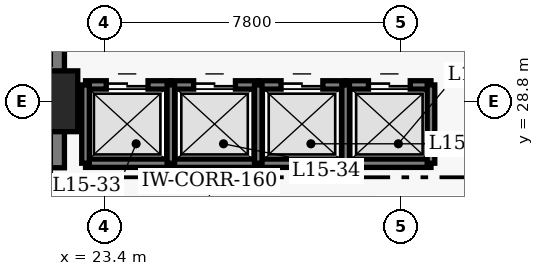
"""IFC4 building model, lengths in metres.
Left out: names, types, materials, properties, quantities, classifications, styles, units other than length and angle.
Written with IfcOpenShell. Run it as: python <this file> out.ifc"""

import sys

from ifc_helpers import new_model, si_unit, direction, frame, frame_2d, origin, origin_2d, place, context, subcontext, project, spatial, rectangle, extrude, element, fill, save


model = new_model("IFC4")
c1 = context("Model", 3, precision=1e-05, world=origin(), true_north=direction((0.0, 1.0)))
c2 = subcontext(c1, "Body", "Model", "MODEL_VIEW")
j1 = project(units=[si_unit("LENGTHUNIT", "METRE"), si_unit("PLANEANGLEUNIT", "RADIAN")], contexts=[c1])
p1 = place(None, origin())
s1 = spatial("IfcSite", under=j1, at=p1, CompositionType="ELEMENT")
p2 = place(p1, origin())
s2 = spatial("IfcBuilding", under=s1, at=p2, CompositionType="ELEMENT")
p3 = place(p2, frame((0.0, 0.0, 64.0)))
s3 = spatial("IfcBuildingStorey", under=s2, at=p3, CompositionType="ELEMENT", Elevation=64.0)
p4 = place(p3, frame((21.9, 27.05, 0.0), z_axis=(0.0, 0.0, 1.0), x_axis=(0.0, 1.0, 0.0)))
e1 = element("IfcWall", 1, at=p4, inside=s3, PredefinedType="SHEAR", context=c2, shape_type="SweptSolid", body=[
    extrude(rectangle(XDim=13.72, YDim=0.9, at=frame_2d((6.86, 0.0))), origin(), (0.0, 0.0, 1.0), 3.8),
])
p5 = place(p3, frame((21.9, 28.8, 0.0), z_axis=(0.0, 0.0, 1.0), x_axis=(1.0, 0.0, 0.0)))
e2 = element("IfcColumn", 2, at=p5, inside=s3, PredefinedType="COLUMN", context=c2, shape_type="SweptSolid", body=[
    extrude(rectangle(XDim=1.6, YDim=1.6, at=origin_2d()), origin(), (0.0, 0.0, 1.0), 3.8),
])
p6 = place(p3, frame((22.905, 29.23, 0.0), z_axis=(0.0, 0.0, 1.0), x_axis=(1.0, 0.0, 0.0)))
e3 = element("IfcWall", 3, at=p6, inside=s3, PredefinedType="SHEAR", context=c2, shape_type="SweptSolid", body=[
    extrude(rectangle(XDim=2.245, YDim=0.22, at=frame_2d((1.123, 0.0))), origin(), (0.0, 0.0, 1.0), 3.8),
])
p7 = place(p6, frame((0.545, 0.0, 0.0)))
e4 = element("IfcOpeningElement", 4, at=p7, cuts=e3, PredefinedType="OPENING", context=c2, shape_type="SweptSolid", body=[
    extrude(rectangle(XDim=1.1, YDim=2.15, at=frame_2d((0.55, 1.075))), frame((0.0, 0.12, 0.0), z_axis=(0.0, -1.0, 0.0), x_axis=(1.0, 0.0, 0.0)), (0.0, 0.0, 1.0), 0.24),
])
p8 = place(p3, frame((22.905, 27.17, 0.0), z_axis=(0.0, 0.0, 1.0), x_axis=(1.0, 0.0, 0.0)))
e5 = element("IfcWall", 5, at=p8, inside=s3, PredefinedType="SHEAR", context=c2, shape_type="SweptSolid", body=[
    extrude(rectangle(XDim=2.245, YDim=0.22, at=frame_2d((1.123, 0.0))), origin(), (0.0, 0.0, 1.0), 3.8),
])
p9 = place(p3, frame((22.905, 27.17, 0.0), z_axis=(0.0, 0.0, 1.0), x_axis=(0.0, 1.0, 0.0)))
e6 = element("IfcWall", 6, at=p9, inside=s3, PredefinedType="SHEAR", context=c2, shape_type="SweptSolid", body=[
    extrude(rectangle(XDim=2.06, YDim=0.2, at=frame_2d((1.03, 0.0))), origin(), (0.0, 0.0, 1.0), 3.8),
])
p10 = place(p3, frame((25.15, 29.23, 0.0), z_axis=(0.0, 0.0, 1.0), x_axis=(1.0, 0.0, 0.0)))
e7 = element("IfcWall", 7, at=p10, inside=s3, PredefinedType="SHEAR", context=c2, shape_type="SweptSolid", body=[
    extrude(rectangle(XDim=2.3, YDim=0.22, at=frame_2d((1.15, 0.0))), origin(), (0.0, 0.0, 1.0), 3.8),
])
p11 = place(p10, frame((0.6, 0.0, 0.0)))
e8 = element("IfcOpeningElement", 8, at=p11, cuts=e7, PredefinedType="OPENING", context=c2, shape_type="SweptSolid", body=[
    extrude(rectangle(XDim=1.1, YDim=2.15, at=frame_2d((0.55, 1.075))), frame((0.0, 0.12, 0.0), z_axis=(0.0, -1.0, 0.0), x_axis=(1.0, 0.0, 0.0)), (0.0, 0.0, 1.0), 0.24),
])
p12 = place(p3, frame((25.15, 27.17, 0.0), z_axis=(0.0, 0.0, 1.0), x_axis=(1.0, 0.0, 0.0)))
e9 = element("IfcWall", 9, at=p12, inside=s3, PredefinedType="SHEAR", context=c2, shape_type="SweptSolid", body=[
    extrude(rectangle(XDim=2.3, YDim=0.22, at=frame_2d((1.15, 0.0))), origin(), (0.0, 0.0, 1.0), 3.8),
])
p13 = place(p3, frame((25.15, 27.17, 0.0), z_axis=(0.0, 0.0, 1.0), x_axis=(0.0, 1.0, 0.0)))
e10 = element("IfcWall", 10, at=p13, inside=s3, PredefinedType="SHEAR", context=c2, shape_type="SweptSolid", body=[
    extrude(rectangle(XDim=2.06, YDim=0.2, at=frame_2d((1.03, 0.0))), origin(), (0.0, 0.0, 1.0), 3.8),
])
p14 = place(p3, frame((27.45, 29.23, 0.0), z_axis=(0.0, 0.0, 1.0), x_axis=(1.0, 0.0, 0.0)))
e11 = element("IfcWall", 11, at=p14, inside=s3, PredefinedType="SHEAR", context=c2, shape_type="SweptSolid", body=[
    extrude(rectangle(XDim=2.3, YDim=0.22, at=frame_2d((1.15, 0.0))), origin(), (0.0, 0.0, 1.0), 3.8),
])
p15 = place(p14, frame((0.6, 0.0, 0.0)))
e12 = element("IfcOpeningElement", 12, at=p15, cuts=e11, PredefinedType="OPENING", context=c2, shape_type="SweptSolid", body=[
    extrude(rectangle(XDim=1.1, YDim=2.15, at=frame_2d((0.55, 1.075))), frame((0.0, 0.12, 0.0), z_axis=(0.0, -1.0, 0.0), x_axis=(1.0, 0.0, 0.0)), (0.0, 0.0, 1.0), 0.24),
])
p16 = place(p3, frame((27.45, 27.17, 0.0), z_axis=(0.0, 0.0, 1.0), x_axis=(1.0, 0.0, 0.0)))
e13 = element("IfcWall", 13, at=p16, inside=s3, PredefinedType="SHEAR", context=c2, shape_type="SweptSolid", body=[
    extrude(rectangle(XDim=2.3, YDim=0.22, at=frame_2d((1.15, 0.0))), origin(), (0.0, 0.0, 1.0), 3.8),
])
p17 = place(p3, frame((27.45, 27.17, 0.0), z_axis=(0.0, 0.0, 1.0), x_axis=(0.0, 1.0, 0.0)))
e14 = element("IfcWall", 14, at=p17, inside=s3, PredefinedType="SHEAR", context=c2, shape_type="SweptSolid", body=[
    extrude(rectangle(XDim=2.06, YDim=0.2, at=frame_2d((1.03, 0.0))), origin(), (0.0, 0.0, 1.0), 3.8),
])
p18 = place(p3, frame((29.75, 29.23, 0.0), z_axis=(0.0, 0.0, 1.0), x_axis=(1.0, 0.0, 0.0)))
e15 = element("IfcWall", 15, at=p18, inside=s3, PredefinedType="SHEAR", context=c2, shape_type="SweptSolid", body=[
    extrude(rectangle(XDim=2.245, YDim=0.22, at=frame_2d((1.123, 0.0))), origin(), (0.0, 0.0, 1.0), 3.8),
])
p19 = place(p18, frame((0.6, 0.0, 0.0)))
e16 = element("IfcOpeningElement", 16, at=p19, cuts=e15, PredefinedType="OPENING", context=c2, shape_type="SweptSolid", body=[
    extrude(rectangle(XDim=1.1, YDim=2.15, at=frame_2d((0.55, 1.075))), frame((0.0, 0.12, 0.0), z_axis=(0.0, -1.0, 0.0), x_axis=(1.0, 0.0, 0.0)), (0.0, 0.0, 1.0), 0.24),
])
p20 = place(p3, frame((29.75, 27.17, 0.0), z_axis=(0.0, 0.0, 1.0), x_axis=(1.0, 0.0, 0.0)))
e17 = element("IfcWall", 17, at=p20, inside=s3, PredefinedType="SHEAR", context=c2, shape_type="SweptSolid", body=[
    extrude(rectangle(XDim=2.245, YDim=0.22, at=frame_2d((1.123, 0.0))), origin(), (0.0, 0.0, 1.0), 3.8),
])
for number, where, z_axis, x_axis in (
    (18, (29.75, 27.17, 0.0), (0.0, 0.0, 1.0), (0.0, 1.0, 0.0)),
    (19, (31.995, 27.17, 0.0), (0.0, 0.0, 1.0), (0.0, 1.0, 0.0)),
):
    element("IfcWall", number, at=place(p3, frame(where, z_axis=z_axis, x_axis=x_axis)), inside=s3, PredefinedType="SHEAR", context=c2, shape_type="SweptSolid", body=[
        extrude(rectangle(XDim=2.06, YDim=0.2, at=frame_2d((1.03, 0.0))), origin(), (0.0, 0.0, 1.0), 3.8),
    ])
p21 = place(p7, origin())
e20 = element("IfcDoor", 20, at=p21, inside=s3, OperationType="DOUBLE_DOOR_SLIDING", PredefinedType="DOOR", context=c2, shape_type="SweptSolid", body=[
    extrude(rectangle(XDim=1.1, YDim=2.15, at=frame_2d((0.55, 1.075))), frame((0.0, 0.025, 0.0), z_axis=(0.0, -1.0, 0.0), x_axis=(1.0, 0.0, 0.0)), (0.0, 0.0, 1.0), 0.05),
])
fill(e4, e20)
p22 = place(p11, origin())
e21 = element("IfcDoor", 21, at=p22, inside=s3, OperationType="DOUBLE_DOOR_SLIDING", PredefinedType="DOOR", context=c2, shape_type="SweptSolid", body=[
    extrude(rectangle(XDim=1.1, YDim=2.15, at=frame_2d((0.55, 1.075))), frame((0.0, 0.025, 0.0), z_axis=(0.0, -1.0, 0.0), x_axis=(1.0, 0.0, 0.0)), (0.0, 0.0, 1.0), 0.05),
])
fill(e8, e21)
p23 = place(p15, origin())
e22 = element("IfcDoor", 22, at=p23, inside=s3, OperationType="DOUBLE_DOOR_SLIDING", PredefinedType="DOOR", context=c2, shape_type="SweptSolid", body=[
    extrude(rectangle(XDim=1.1, YDim=2.15, at=frame_2d((0.55, 1.075))), frame((0.0, 0.025, 0.0), z_axis=(0.0, -1.0, 0.0), x_axis=(1.0, 0.0, 0.0)), (0.0, 0.0, 1.0), 0.05),
])
fill(e12, e22)
p24 = place(p19, origin())
e23 = element("IfcDoor", 23, at=p24, inside=s3, OperationType="DOUBLE_DOOR_SLIDING", PredefinedType="DOOR", context=c2, shape_type="SweptSolid", body=[
    extrude(rectangle(XDim=1.1, YDim=2.15, at=frame_2d((0.55, 1.075))), frame((0.0, 0.025, 0.0), z_axis=(0.0, -1.0, 0.0), x_axis=(1.0, 0.0, 0.0)), (0.0, 0.0, 1.0), 0.05),
])
fill(e16, e23)
save(model, sys.argv[1])
